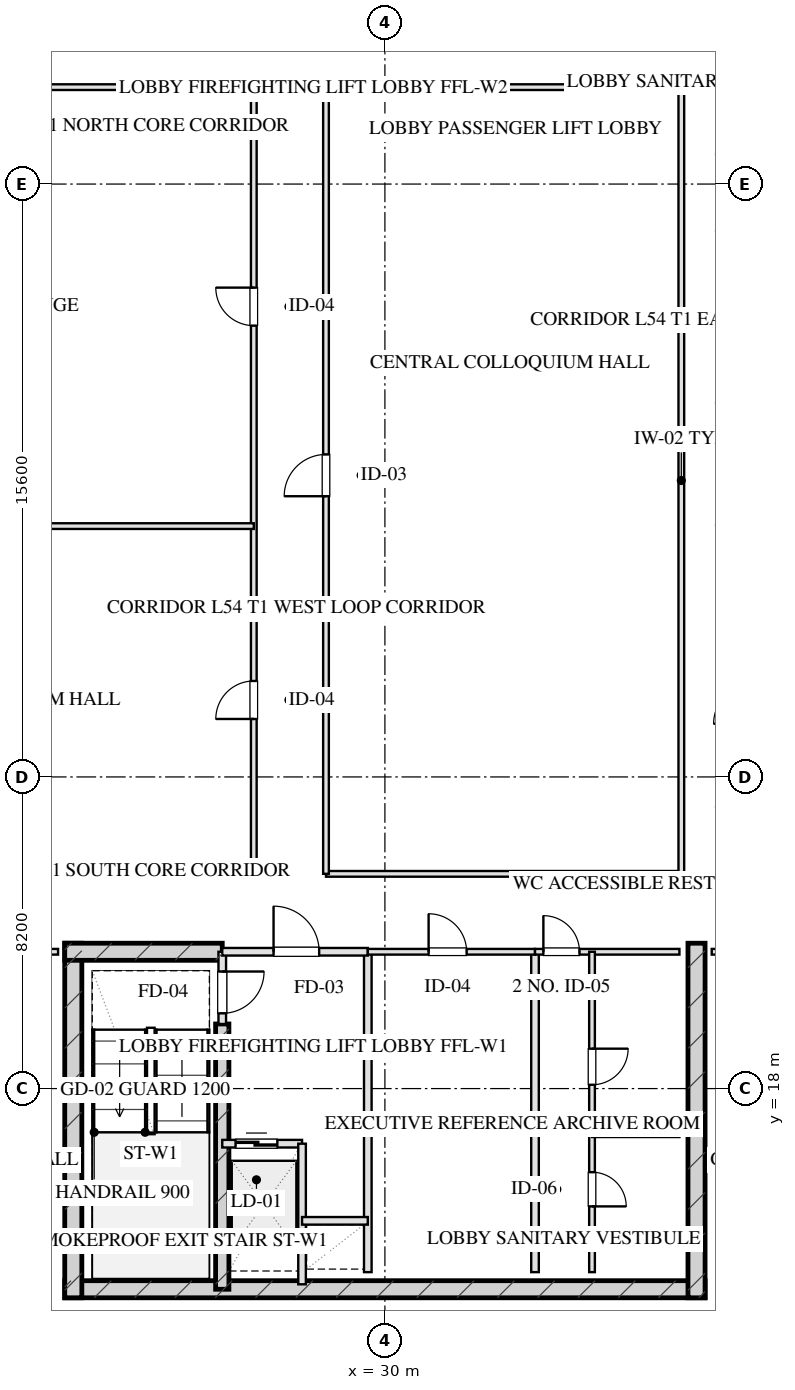
"""IFC4 building model, lengths in metres.
Left out: names, types, materials, properties, quantities, classifications, styles, units other than length and angle.
Written with IfcOpenShell. Run it as: python <this file> out.ifc"""

import sys

from ifc_helpers import new_model, si_unit, direction, frame, frame_2d, origin, place, context, subcontext, project, spatial, rectangle, extrude, element, fill, save


model = new_model("IFC4")
c1 = context("Model", 3, precision=1e-05, world=origin(), true_north=direction((0.0, 1.0)))
c2 = subcontext(c1, "Body", "Model", "MODEL_VIEW")
j1 = project(units=[si_unit("LENGTHUNIT", "METRE"), si_unit("PLANEANGLEUNIT", "RADIAN")], contexts=[c1])
p1 = place(None, origin())
s1 = spatial("IfcSite", under=j1, at=p1, CompositionType="ELEMENT")
p2 = place(p1, origin())
s2 = spatial("IfcBuilding", under=s1, at=p2, CompositionType="ELEMENT")
p3 = place(p2, frame((0.0, 0.0, 202.4)))
s3 = spatial("IfcBuildingStorey", under=s2, at=p3, CompositionType="ELEMENT", Elevation=202.4)
p4 = place(p3, frame((21.575, 12.72, 0.0), z_axis=(0.0, 0.0, 1.0), x_axis=(1.0, 0.0, 0.0)))
e1 = element("IfcWall", 1, at=p4, inside=s3, PredefinedType="SHEAR", context=c2, shape_type="SweptSolid", body=[
    extrude(rectangle(XDim=16.85, YDim=0.45, at=frame_2d((8.425, 0.0))), origin(), (0.0, 0.0, 1.0), 3.45),
])
for number, where, z_axis, x_axis in (
    (2, (21.8, 21.825, 0.0), (0.0, 0.0, 1.0), (0.0, -1.0, 0.0)),
    (3, (38.2, 21.825, 0.0), (0.0, 0.0, 1.0), (0.0, -1.0, 0.0)),
):
    element("IfcWall", number, at=place(p3, frame(where, z_axis=z_axis, x_axis=x_axis)), inside=s3, PredefinedType="SHEAR", context=c2, shape_type="SweptSolid", body=[
        extrude(rectangle(XDim=9.33, YDim=0.45, at=frame_2d((4.665, 0.0))), origin(), (0.0, 0.0, 1.0), 3.45),
    ])
p5 = place(p3, frame((25.72, 19.7, 0.0), z_axis=(0.0, 0.0, 1.0), x_axis=(0.0, -1.0, 0.0)))
e4 = element("IfcWall", 4, at=p5, inside=s3, PredefinedType="SHEAR", context=c2, shape_type="SweptSolid", body=[
    extrude(rectangle(XDim=6.98, YDim=0.35, at=frame_2d((3.49, 0.0))), origin(), (0.0, 0.0, 1.0), 3.45),
])
p6 = place(p3, frame((21.575, 21.6, 0.0), z_axis=(0.0, 0.0, 1.0), x_axis=(1.0, 0.0, 0.0)))
e5 = element("IfcWall", 5, at=p6, inside=s3, PredefinedType="SHEAR", context=c2, shape_type="SweptSolid", body=[
    extrude(rectangle(XDim=4.145, YDim=0.45, at=frame_2d((2.073, 0.0))), origin(), (0.0, 0.0, 1.0), 3.45),
])
p7 = place(p3, frame((25.72, 21.6, 0.0), z_axis=(0.0, 0.0, 1.0), x_axis=(0.0, -1.0, 0.0)))
e6 = element("IfcWall", 6, at=p7, inside=s3, PredefinedType="PARTITIONING", context=c2, shape_type="SweptSolid", body=[
    extrude(rectangle(XDim=1.9, YDim=0.2, at=frame_2d((0.95, 0.0))), origin(), (0.0, 0.0, 1.0), 3.175),
])
p8 = place(p7, frame((0.52, 0.0, 0.0)))
e7 = element("IfcOpeningElement", 7, at=p8, cuts=e6, PredefinedType="OPENING", context=c2, shape_type="SweptSolid", body=[
    extrude(rectangle(XDim=1.1, YDim=2.05, at=frame_2d((0.55, 1.025))), frame((0.0, 0.11, 0.0), z_axis=(0.0, -1.0, 0.0), x_axis=(1.0, 0.0, 0.0)), (0.0, 0.0, 1.0), 0.22),
])
p9 = place(p3, frame((29.55, 21.6, 0.0), z_axis=(0.0, 0.0, 1.0), x_axis=(0.0, -1.0, 0.0)))
e8 = element("IfcWall", 8, at=p9, inside=s3, PredefinedType="PARTITIONING", context=c2, shape_type="SweptSolid", body=[
    extrude(rectangle(XDim=8.43, YDim=0.2, at=frame_2d((4.215, 0.0))), origin(), (0.0, 0.0, 1.0), 3.175),
])
p10 = place(p3, frame((25.72, 21.6, 0.0), z_axis=(0.0, 0.0, 1.0), x_axis=(1.0, 0.0, 0.0)))
e9 = element("IfcWall", 9, at=p10, inside=s3, PredefinedType="PARTITIONING", context=c2, shape_type="SweptSolid", body=[
    extrude(rectangle(XDim=3.83, YDim=0.2, at=frame_2d((1.915, 0.0))), origin(), (0.0, 0.0, 1.0), 3.175),
])
p11 = place(p10, frame((1.35, 0.0, 0.0)))
e10 = element("IfcOpeningElement", 10, at=p11, cuts=e9, PredefinedType="OPENING", context=c2, shape_type="SweptSolid", body=[
    extrude(rectangle(XDim=1.2, YDim=2.05, at=frame_2d((0.6, 1.025))), frame((0.0, 0.11, 0.0), z_axis=(0.0, -1.0, 0.0), x_axis=(1.0, 0.0, 0.0)), (0.0, 0.0, 1.0), 0.22),
])
p12 = place(p3, frame((25.72, 16.55, 0.0), z_axis=(0.0, 0.0, 1.0), x_axis=(1.0, 0.0, 0.0)))
e11 = element("IfcWall", 11, at=p12, inside=s3, PredefinedType="PARTITIONING", context=c2, shape_type="SweptSolid", body=[
    extrude(rectangle(XDim=2.1, YDim=0.2, at=frame_2d((1.05, 0.0))), origin(), (0.0, 0.0, 1.0), 3.175),
])
p13 = place(p12, frame((0.35, 0.0, 0.0)))
e12 = element("IfcOpeningElement", 12, at=p13, cuts=e11, PredefinedType="OPENING", context=c2, shape_type="SweptSolid", body=[
    extrude(rectangle(XDim=1.1, YDim=2.05, at=frame_2d((0.55, 1.025))), frame((0.0, 0.11, 0.0), z_axis=(0.0, -1.0, 0.0), x_axis=(1.0, 0.0, 0.0)), (0.0, 0.0, 1.0), 0.22),
])
p14 = place(p3, frame((27.82, 16.55, 0.0), z_axis=(0.0, 0.0, 1.0), x_axis=(0.0, -1.0, 0.0)))
e13 = element("IfcWall", 13, at=p14, inside=s3, PredefinedType="PARTITIONING", context=c2, shape_type="SweptSolid", body=[
    extrude(rectangle(XDim=3.7, YDim=0.2, at=frame_2d((1.85, 0.0))), origin(), (0.0, 0.0, 1.0), 3.175),
])
p15 = place(p3, frame((27.82, 14.52, 0.0), z_axis=(0.0, 0.0, 1.0), x_axis=(1.0, 0.0, 0.0)))
e14 = element("IfcWall", 14, at=p15, inside=s3, PredefinedType="PARTITIONING", context=c2, shape_type="SweptSolid", body=[
    extrude(rectangle(XDim=1.73, YDim=0.2, at=frame_2d((0.865, 0.0))), origin(), (0.0, 0.0, 1.0), 3.175),
])
p16 = place(p3, frame((33.95, 21.6, 0.0), z_axis=(0.0, 0.0, 1.0), x_axis=(0.0, -1.0, 0.0)))
e15 = element("IfcWall", 15, at=p16, inside=s3, PredefinedType="PARTITIONING", context=c2, shape_type="SweptSolid", body=[
    extrude(rectangle(XDim=8.43, YDim=0.2, at=frame_2d((4.215, 0.0))), origin(), (0.0, 0.0, 1.0), 3.175),
])
p17 = place(p3, frame((29.55, 21.6, 0.0), z_axis=(0.0, 0.0, 1.0), x_axis=(1.0, 0.0, 0.0)))
e16 = element("IfcWall", 16, at=p17, inside=s3, PredefinedType="PARTITIONING", context=c2, shape_type="SweptSolid", body=[
    extrude(rectangle(XDim=4.4, YDim=0.15, at=frame_2d((2.2, 0.0))), origin(), (0.0, 0.0, 1.0), 3.175),
])
p18 = place(p17, frame((1.6, 0.0, 0.0)))
e17 = element("IfcOpeningElement", 17, at=p18, cuts=e16, PredefinedType="OPENING", context=c2, shape_type="SweptSolid", body=[
    extrude(rectangle(XDim=1.0, YDim=2.05, at=frame_2d((0.5, 1.025))), frame((0.0, 0.085, 0.0), z_axis=(0.0, -1.0, 0.0), x_axis=(1.0, 0.0, 0.0)), (0.0, 0.0, 1.0), 0.17),
])
p19 = place(p3, frame((33.95, 21.6, 0.0), z_axis=(0.0, 0.0, 1.0), x_axis=(1.0, 0.0, 0.0)))
e18 = element("IfcWall", 18, at=p19, inside=s3, PredefinedType="PARTITIONING", context=c2, shape_type="SweptSolid", body=[
    extrude(rectangle(XDim=3.8, YDim=0.15, at=frame_2d((1.9, 0.0))), origin(), (0.0, 0.0, 1.0), 3.175),
])
p20 = place(p19, frame((0.22, 0.0, 0.0)))
e19 = element("IfcOpeningElement", 19, at=p20, cuts=e18, PredefinedType="OPENING", context=c2, shape_type="SweptSolid", body=[
    extrude(rectangle(XDim=0.95, YDim=2.05, at=frame_2d((0.475, 1.025))), frame((0.0, 0.085, 0.0), z_axis=(0.0, -1.0, 0.0), x_axis=(1.0, 0.0, 0.0)), (0.0, 0.0, 1.0), 0.17),
])
p21 = place(p3, frame((35.45, 21.6, 0.0), z_axis=(0.0, 0.0, 1.0), x_axis=(0.0, -1.0, 0.0)))
e20 = element("IfcWall", 20, at=p21, inside=s3, PredefinedType="PARTITIONING", context=c2, shape_type="SweptSolid", body=[
    extrude(rectangle(XDim=8.43, YDim=0.15, at=frame_2d((4.215, 0.0))), origin(), (0.0, 0.0, 1.0), 2.765),
])
p22 = place(p21, frame((2.55, 0.0, 0.0)))
e21 = element("IfcOpeningElement", 21, at=p22, cuts=e20, PredefinedType="OPENING", context=c2, shape_type="SweptSolid", body=[
    extrude(rectangle(XDim=0.95, YDim=2.05, at=frame_2d((0.475, 1.025))), frame((0.0, 0.085, 0.0), z_axis=(0.0, -1.0, 0.0), x_axis=(1.0, 0.0, 0.0)), (0.0, 0.0, 1.0), 0.17),
])
p23 = place(p21, frame((5.8, 0.0, 0.0)))
e22 = element("IfcOpeningElement", 22, at=p23, cuts=e20, PredefinedType="OPENING", context=c2, shape_type="SweptSolid", body=[
    extrude(rectangle(XDim=0.9, YDim=2.05, at=frame_2d((0.45, 1.025))), frame((0.0, 0.085, 0.0), z_axis=(0.0, -1.0, 0.0), x_axis=(1.0, 0.0, 0.0)), (0.0, 0.0, 1.0), 0.17),
])
p24 = place(p3, frame((35.45, 16.8, 0.0), z_axis=(0.0, 0.0, 1.0), x_axis=(1.0, 0.0, 0.0)))
e23 = element("IfcWall", 23, at=p24, inside=s3, PredefinedType="PARTITIONING", context=c2, shape_type="SweptSolid", body=[
    extrude(rectangle(XDim=2.3, YDim=0.15, at=frame_2d((1.15, 0.0))), origin(), (0.0, 0.0, 1.0), 3.175),
])
p25 = place(p3, frame((13.2, 21.6, 0.0), z_axis=(0.0, 0.0, 1.0), x_axis=(1.0, 0.0, 0.0)))
e24 = element("IfcWall", 24, at=p25, inside=s3, PredefinedType="PARTITIONING", context=c2, shape_type="SweptSolid", body=[
    extrude(rectangle(XDim=8.2, YDim=0.15, at=frame_2d((4.1, 0.0))), origin(), (0.0, 0.0, 1.0), 3.175),
])
p26 = place(p25, frame((3.444, 0.0, 0.0)))
e25 = element("IfcOpeningElement", 25, at=p26, cuts=e24, PredefinedType="OPENING", context=c2, shape_type="SweptSolid", body=[
    extrude(rectangle(XDim=1.0, YDim=2.05, at=frame_2d((0.5, 1.025))), frame((0.0, 0.085, 0.0), z_axis=(0.0, -1.0, 0.0), x_axis=(1.0, 0.0, 0.0)), (0.0, 0.0, 1.0), 0.17),
])
p27 = place(p3, frame((38.6, 21.6, 0.0), z_axis=(0.0, 0.0, 1.0), x_axis=(1.0, 0.0, 0.0)))
e26 = element("IfcWall", 26, at=p27, inside=s3, PredefinedType="PARTITIONING", context=c2, shape_type="SweptSolid", body=[
    extrude(rectangle(XDim=8.2, YDim=0.15, at=frame_2d((4.1, 0.0))), origin(), (0.0, 0.0, 1.0), 3.175),
])
p28 = place(p27, frame((3.444, 0.0, 0.0)))
e27 = element("IfcOpeningElement", 27, at=p28, cuts=e26, PredefinedType="OPENING", context=c2, shape_type="SweptSolid", body=[
    extrude(rectangle(XDim=1.05, YDim=2.05, at=frame_2d((0.525, 1.025))), frame((0.0, 0.085, 0.0), z_axis=(0.0, -1.0, 0.0), x_axis=(1.0, 0.0, 0.0)), (0.0, 0.0, 1.0), 0.17),
])
p29 = place(p3, frame((13.2, 23.65, 0.0), z_axis=(0.0, 0.0, 1.0), x_axis=(1.0, 0.0, 0.0)))
e28 = element("IfcWall", 28, at=p29, inside=s3, PredefinedType="PARTITIONING", context=c2, shape_type="SweptSolid", body=[
    extrude(rectangle(XDim=13.35, YDim=0.15, at=frame_2d((6.675, 0.0))), origin(), (0.0, 0.0, 1.0), 3.175),
])
p30 = place(p3, frame((28.45, 23.65, 0.0), z_axis=(0.0, 0.0, 1.0), x_axis=(1.0, 0.0, 0.0)))
e29 = element("IfcWall", 29, at=p30, inside=s3, PredefinedType="PARTITIONING", context=c2, shape_type="SweptSolid", body=[
    extrude(rectangle(XDim=9.35, YDim=0.15, at=frame_2d((4.675, 0.0))), origin(), (0.0, 0.0, 1.0), 3.175),
])
p31 = place(p3, frame((13.2, 44.35, 0.0), z_axis=(0.0, 0.0, 1.0), x_axis=(1.0, 0.0, 0.0)))
e30 = element("IfcWall", 30, at=p31, inside=s3, PredefinedType="PARTITIONING", context=c2, shape_type="SweptSolid", body=[
    extrude(rectangle(XDim=13.35, YDim=0.15, at=frame_2d((6.675, 0.0))), origin(), (0.0, 0.0, 1.0), 3.175),
])
p32 = place(p3, frame((28.45, 44.35, 0.0), z_axis=(0.0, 0.0, 1.0), x_axis=(1.0, 0.0, 0.0)))
e31 = element("IfcWall", 31, at=p32, inside=s3, PredefinedType="PARTITIONING", context=c2, shape_type="SweptSolid", body=[
    extrude(rectangle(XDim=9.35, YDim=0.15, at=frame_2d((4.675, 0.0))), origin(), (0.0, 0.0, 1.0), 3.175),
])
p33 = place(p3, frame((26.55, 23.65, 0.0), z_axis=(0.0, 0.0, 1.0), x_axis=(0.0, 1.0, 0.0)))
e32 = element("IfcWall", 32, at=p33, inside=s3, PredefinedType="PARTITIONING", context=c2, shape_type="SweptSolid", body=[
    extrude(rectangle(XDim=20.7, YDim=0.15, at=frame_2d((10.35, 0.0))), origin(), (0.0, 0.0, 1.0), 3.175),
])
p34 = place(p33, frame((4.075, 0.0, 0.0)))
e33 = element("IfcOpeningElement", 33, at=p34, cuts=e32, PredefinedType="OPENING", context=c2, shape_type="SweptSolid", body=[
    extrude(rectangle(XDim=1.0, YDim=2.05, at=frame_2d((0.5, 1.025))), frame((0.0, 0.085, 0.0), z_axis=(0.0, -1.0, 0.0), x_axis=(1.0, 0.0, 0.0)), (0.0, 0.0, 1.0), 0.17),
])
p35 = place(p33, frame((14.425, 0.0, 0.0)))
e34 = element("IfcOpeningElement", 34, at=p35, cuts=e32, PredefinedType="OPENING", context=c2, shape_type="SweptSolid", body=[
    extrude(rectangle(XDim=1.0, YDim=2.05, at=frame_2d((0.5, 1.025))), frame((0.0, 0.085, 0.0), z_axis=(0.0, -1.0, 0.0), x_axis=(1.0, 0.0, 0.0)), (0.0, 0.0, 1.0), 0.17),
])
p36 = place(p3, frame((28.45, 23.65, 0.0), z_axis=(0.0, 0.0, 1.0), x_axis=(0.0, 1.0, 0.0)))
e35 = element("IfcWall", 35, at=p36, inside=s3, PredefinedType="PARTITIONING", context=c2, shape_type="SweptSolid", body=[
    extrude(rectangle(XDim=20.7, YDim=0.15, at=frame_2d((10.35, 0.0))), origin(), (0.0, 0.0, 1.0), 3.175),
])
p37 = place(p36, frame((9.936, 0.0, 0.0)))
e36 = element("IfcOpeningElement", 36, at=p37, cuts=e35, PredefinedType="OPENING", context=c2, shape_type="SweptSolid", body=[
    extrude(rectangle(XDim=1.1, YDim=2.05, at=frame_2d((0.55, 1.025))), frame((0.0, 0.085, 0.0), z_axis=(0.0, -1.0, 0.0), x_axis=(1.0, 0.0, 0.0)), (0.0, 0.0, 1.0), 0.17),
])
p38 = place(p3, frame((37.8, 23.65, 0.0), z_axis=(0.0, 0.0, 1.0), x_axis=(0.0, 1.0, 0.0)))
e37 = element("IfcWall", 37, at=p38, inside=s3, PredefinedType="PARTITIONING", context=c2, shape_type="SweptSolid", body=[
    extrude(rectangle(XDim=20.7, YDim=0.15, at=frame_2d((10.35, 0.0))), origin(), (0.0, 0.0, 1.0), 3.175),
])
p39 = place(p3, frame((13.2, 32.8, 0.0), z_axis=(0.0, 0.0, 1.0), x_axis=(1.0, 0.0, 0.0)))
e38 = element("IfcWall", 38, at=p39, inside=s3, PredefinedType="PARTITIONING", context=c2, shape_type="SweptSolid", body=[
    extrude(rectangle(XDim=13.35, YDim=0.15, at=frame_2d((6.675, 0.0))), origin(), (0.0, 0.0, 1.0), 3.175),
])
p40 = place(p8, origin())
e39 = element("IfcDoor", 39, at=p40, inside=s3, OperationType="SINGLE_SWING_LEFT", PredefinedType="DOOR", context=c2, shape_type="SweptSolid", body=[
    extrude(rectangle(XDim=1.1, YDim=2.05, at=frame_2d((0.55, 1.025))), frame((0.0, 0.025, 0.0), z_axis=(0.0, -1.0, 0.0), x_axis=(1.0, 0.0, 0.0)), (0.0, 0.0, 1.0), 0.05),
])
fill(e7, e39)
p41 = place(p11, origin())
e40 = element("IfcDoor", 40, at=p41, inside=s3, OperationType="SINGLE_SWING_LEFT", PredefinedType="DOOR", context=c2, shape_type="SweptSolid", body=[
    extrude(rectangle(XDim=1.2, YDim=2.05, at=frame_2d((0.6, 1.025))), frame((0.0, 0.025, 0.0), z_axis=(0.0, -1.0, 0.0), x_axis=(1.0, 0.0, 0.0)), (0.0, 0.0, 1.0), 0.05),
])
fill(e10, e40)
p42 = place(p13, origin())
e41 = element("IfcDoor", 41, at=p42, inside=s3, OperationType="DOUBLE_DOOR_SLIDING", PredefinedType="DOOR", context=c2, shape_type="SweptSolid", body=[
    extrude(rectangle(XDim=1.1, YDim=2.05, at=frame_2d((0.55, 1.025))), frame((0.0, 0.025, 0.0), z_axis=(0.0, -1.0, 0.0), x_axis=(1.0, 0.0, 0.0)), (0.0, 0.0, 1.0), 0.05),
])
fill(e12, e41)
p43 = place(p18, origin())
e42 = element("IfcDoor", 42, at=p43, inside=s3, OperationType="SINGLE_SWING_LEFT", PredefinedType="DOOR", context=c2, shape_type="SweptSolid", body=[
    extrude(rectangle(XDim=1.0, YDim=2.05, at=frame_2d((0.5, 1.025))), frame((0.0, 0.025, 0.0), z_axis=(0.0, -1.0, 0.0), x_axis=(1.0, 0.0, 0.0)), (0.0, 0.0, 1.0), 0.05),
])
fill(e17, e42)
p44 = place(p20, origin())
e43 = element("IfcDoor", 43, at=p44, inside=s3, OperationType="SINGLE_SWING_LEFT", PredefinedType="DOOR", context=c2, shape_type="SweptSolid", body=[
    extrude(rectangle(XDim=0.95, YDim=2.05, at=frame_2d((0.475, 1.025))), frame((0.0, 0.025, 0.0), z_axis=(0.0, -1.0, 0.0), x_axis=(1.0, 0.0, 0.0)), (0.0, 0.0, 1.0), 0.05),
])
fill(e19, e43)
p45 = place(p22, origin())
e44 = element("IfcDoor", 44, at=p45, inside=s3, OperationType="SINGLE_SWING_LEFT", PredefinedType="DOOR", context=c2, shape_type="SweptSolid", body=[
    extrude(rectangle(XDim=0.95, YDim=2.05, at=frame_2d((0.475, 1.025))), frame((0.0, 0.025, 0.0), z_axis=(0.0, -1.0, 0.0), x_axis=(1.0, 0.0, 0.0)), (0.0, 0.0, 1.0), 0.05),
])
fill(e21, e44)
p46 = place(p23, origin())
e45 = element("IfcDoor", 45, at=p46, inside=s3, OperationType="SINGLE_SWING_RIGHT", PredefinedType="DOOR", context=c2, shape_type="SweptSolid", body=[
    extrude(rectangle(XDim=0.9, YDim=2.05, at=frame_2d((0.45, 1.025))), frame((0.0, 0.025, 0.0), z_axis=(0.0, -1.0, 0.0), x_axis=(1.0, 0.0, 0.0)), (0.0, 0.0, 1.0), 0.05),
])
fill(e22, e45)
p47 = place(p34, origin())
e46 = element("IfcDoor", 46, at=p47, inside=s3, OperationType="SINGLE_SWING_LEFT", PredefinedType="DOOR", context=c2, shape_type="SweptSolid", body=[
    extrude(rectangle(XDim=1.0, YDim=2.05, at=frame_2d((0.5, 1.025))), frame((0.0, 0.025, 0.0), z_axis=(0.0, -1.0, 0.0), x_axis=(1.0, 0.0, 0.0)), (0.0, 0.0, 1.0), 0.05),
])
fill(e33, e46)
p48 = place(p35, origin())
e47 = element("IfcDoor", 47, at=p48, inside=s3, OperationType="SINGLE_SWING_RIGHT", PredefinedType="DOOR", context=c2, shape_type="SweptSolid", body=[
    extrude(rectangle(XDim=1.0, YDim=2.05, at=frame_2d((0.5, 1.025))), frame((0.0, 0.025, 0.0), z_axis=(0.0, -1.0, 0.0), x_axis=(1.0, 0.0, 0.0)), (0.0, 0.0, 1.0), 0.05),
])
fill(e34, e47)
p49 = place(p37, origin())
e48 = element("IfcDoor", 48, at=p49, inside=s3, OperationType="SINGLE_SWING_LEFT", PredefinedType="DOOR", context=c2, shape_type="SweptSolid", body=[
    extrude(rectangle(XDim=1.1, YDim=2.05, at=frame_2d((0.55, 1.025))), frame((0.0, 0.025, 0.0), z_axis=(0.0, -1.0, 0.0), x_axis=(1.0, 0.0, 0.0)), (0.0, 0.0, 1.0), 0.05),
])
fill(e36, e48)
save(model, sys.argv[1])
